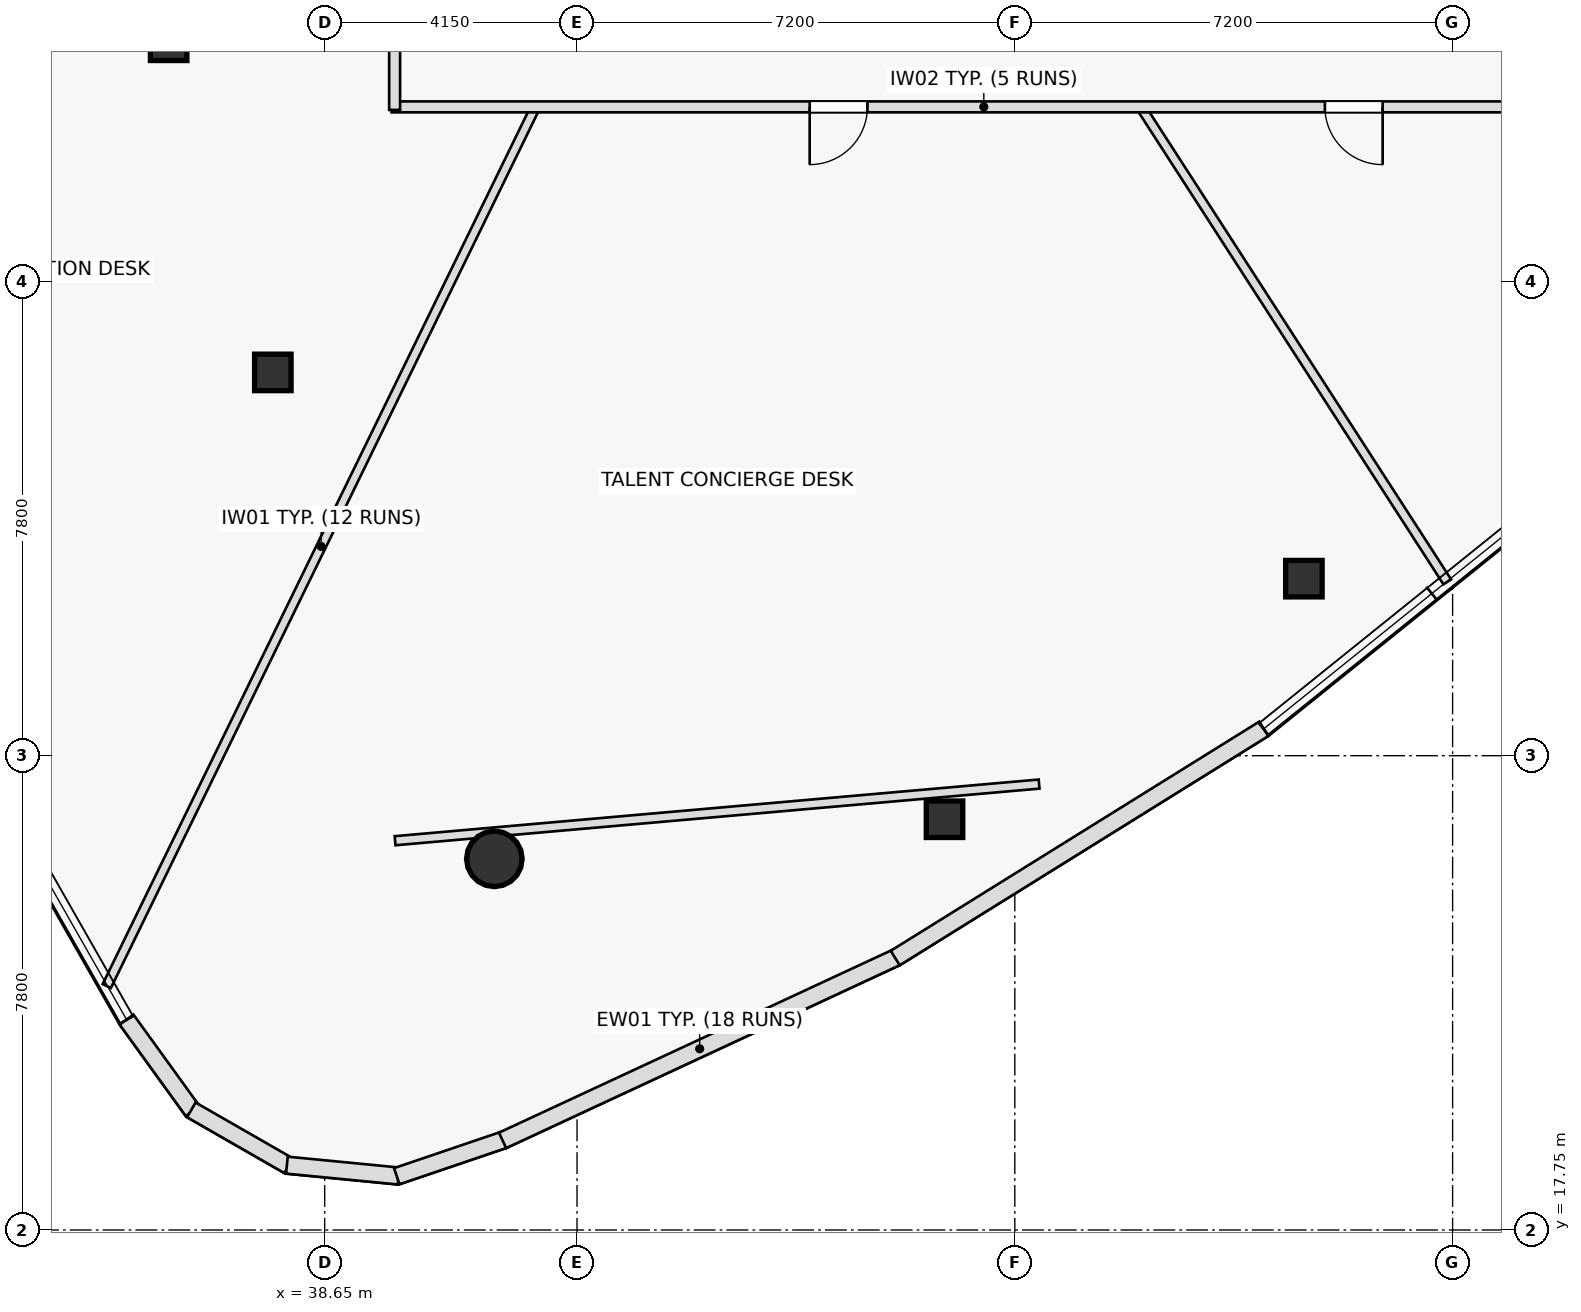
"""IFC4 building model, lengths in metres.
Left out: names, types, materials, properties, quantities, classifications, styles, units other than length and angle.
Written with IfcOpenShell. Run it as: python <this file> out.ifc"""

import sys

from ifc_helpers import new_model, si_unit, direction, frame, frame_2d, origin, origin_2d, place, context, subcontext, project, spatial, rectangle, hollow_rectangle, hollow_circle, extrude, element, fill, save


model = new_model("IFC4")
c1 = context("Model", 3, precision=1e-05, world=origin(), true_north=direction((0.0, 1.0)))
c2 = subcontext(c1, "Body", "Model", "MODEL_VIEW")
j1 = project(units=[si_unit("LENGTHUNIT", "METRE"), si_unit("PLANEANGLEUNIT", "RADIAN")], contexts=[c1])
p1 = place(None, origin())
s1 = spatial("IfcSite", under=j1, at=p1, CompositionType="ELEMENT")
p2 = place(p1, origin())
s2 = spatial("IfcBuilding", under=s1, at=p2, CompositionType="ELEMENT")
p3 = place(p2, frame((0.0, 0.0, 216.95)))
s3 = spatial("IfcBuildingStorey", under=s2, at=p3, CompositionType="ELEMENT", Elevation=216.95)
for number, where, z_axis, x_axis in (
    (1, (36.083, 37.282, 0.0), (0.0, 0.0, 1.0), (1.0, 0.0, 0.0)),
    (2, (37.797, 31.853, 0.0), (0.0, 0.0, 1.0), (1.0, 0.0, 0.0)),
):
    element("IfcColumn", number, at=place(p3, frame(where, z_axis=z_axis, x_axis=x_axis)), inside=s3, PredefinedType="COLUMN", context=c2, shape_type="SweptSolid", body=[
        extrude(hollow_rectangle(XDim=0.6, YDim=0.6, WallThickness=0.036, at=origin_2d()), origin(), (0.0, 0.0, 1.0), 4.9),
    ])
p4 = place(p3, frame((41.44, 23.854, 0.0), z_axis=(0.0, 0.0, 1.0), x_axis=(1.0, 0.0, 0.0)))
e3 = element("IfcColumn", 3, at=p4, inside=s3, PredefinedType="COLUMN", context=c2, shape_type="SweptSolid", body=[
    extrude(hollow_circle(Radius=0.457, WallThickness=0.04, at=origin_2d()), origin(), (0.0, 0.0, 1.0), 4.9),
])
for number, where, z_axis, x_axis in (
    (4, (48.844, 24.505, 0.0), (0.0, 0.0, 1.0), (1.0, 0.0, 0.0)),
    (5, (54.754, 28.462, 0.0), (0.0, 0.0, 1.0), (1.0, 0.0, 0.0)),
):
    element("IfcColumn", number, at=place(p3, frame(where, z_axis=z_axis, x_axis=x_axis)), inside=s3, PredefinedType="COLUMN", context=c2, shape_type="SweptSolid", body=[
        extrude(hollow_rectangle(XDim=0.6, YDim=0.6, WallThickness=0.036, at=origin_2d()), origin(), (0.0, 0.0, 1.0), 4.9),
    ])
p5 = place(p3, frame((39.808, 24.152, 0.0), z_axis=(0.0, 0.0, 1.0), x_axis=(0.996153584085, 0.087624408208, 0.0)))
e6 = element("IfcWall", 6, at=p5, inside=s3, PredefinedType="PARTITIONING", context=c2, shape_type="SweptSolid", body=[
    extrude(rectangle(XDim=10.632, YDim=0.15, at=frame_2d((5.316, 0.0))), origin(), (0.0, 0.0, 1.0), 4.385),
])
p6 = place(p3, frame((42.118, 36.22, 0.0), z_axis=(0.0, 0.0, 1.0), x_axis=(-0.438364723484, -0.898797179126, 0.0)))
e7 = element("IfcWall", 7, at=p6, inside=s3, PredefinedType="PARTITIONING", context=c2, shape_type="SweptSolid", body=[
    extrude(rectangle(XDim=16.086, YDim=0.15, at=frame_2d((8.043, 0.0))), origin(), (0.0, 0.0, 1.0), 4.385),
])
p7 = place(p3, frame((52.069, 36.22, 0.0), z_axis=(0.0, 0.0, 1.0), x_axis=(0.542431242732, -0.840100200516, 0.0)))
e8 = element("IfcWall", 8, at=p7, inside=s3, PredefinedType="PARTITIONING", context=c2, shape_type="SweptSolid", body=[
    extrude(rectangle(XDim=9.298, YDim=0.15, at=frame_2d((4.649, 0.0))), origin(), (0.0, 0.0, 1.0), 4.275),
])
p8 = place(p3, frame((59.23, 36.22, 0.0), z_axis=(0.0, 0.0, 1.0), x_axis=(-1.0, 0.0, 0.0)))
e9 = element("IfcWall", 9, at=p8, inside=s3, PredefinedType="PARTITIONING", context=c2, shape_type="SweptSolid", body=[
    extrude(rectangle(XDim=19.48, YDim=0.18, at=frame_2d((9.74, 0.0))), origin(), (0.0, 0.0, 1.0), 4.275),
])
p9 = place(p8, frame((3.18, 0.0, 0.0)))
e10 = element("IfcOpeningElement", 10, at=p9, cuts=e9, PredefinedType="OPENING", context=c2, shape_type="SweptSolid", body=[
    extrude(rectangle(XDim=0.95, YDim=2.05, at=frame_2d((0.475, 1.025))), frame((0.0, 0.1, 0.0), z_axis=(0.0, -1.0, 0.0), x_axis=(1.0, 0.0, 0.0)), (0.0, 0.0, 1.0), 0.2),
])
p10 = place(p8, frame((11.654, 0.0, 0.0)))
e11 = element("IfcOpeningElement", 11, at=p10, cuts=e9, PredefinedType="OPENING", context=c2, shape_type="SweptSolid", body=[
    extrude(rectangle(XDim=0.95, YDim=2.05, at=frame_2d((0.475, 1.025))), frame((0.0, 0.1, 0.0), z_axis=(0.0, -1.0, 0.0), x_axis=(1.0, 0.0, 0.0)), (0.0, 0.0, 1.0), 0.2),
])
p11 = place(p3, frame((39.8, 36.17, 0.0), z_axis=(0.0, 0.0, 1.0), x_axis=(0.0, 1.0, 0.0)))
e12 = element("IfcWall", 12, at=p11, inside=s3, PredefinedType="PARTITIONING", context=c2, shape_type="SweptSolid", body=[
    extrude(rectangle(XDim=4.08, YDim=0.18, at=frame_2d((2.04, 0.0))), origin(), (0.0, 0.0, 1.0), 4.575),
])
p12 = place(p11, frame((1.565, 0.0, 0.0)))
e13 = element("IfcOpeningElement", 13, at=p12, cuts=e12, PredefinedType="OPENING", context=c2, shape_type="SweptSolid", body=[
    extrude(rectangle(XDim=0.95, YDim=2.05, at=frame_2d((0.475, 1.025))), frame((0.0, 0.1, 0.0), z_axis=(0.0, -1.0, 0.0), x_axis=(1.0, 0.0, 0.0)), (0.0, 0.0, 1.0), 0.2),
])
p13 = place(p3, frame((35.391, 21.21, 0.0), z_axis=(0.0, 0.0, 1.0), x_axis=(0.585721048236, -0.810512710359, 0.0)))
e14 = element("IfcWall", 14, at=p13, inside=s3, PredefinedType="STANDARD", context=c2, shape_type="SweptSolid", body=[
    extrude(rectangle(XDim=1.856, YDim=0.28, at=frame_2d((0.928, 0.0))), origin(), (0.0, 0.0, 1.0), 4.9),
])
for number, where, z_axis, x_axis in (
    (15, (36.457, 19.726, 0.0), (0.0, 0.0, 1.0), (0.867, -0.498, 0.0)),
    (16, (38.028, 18.817, 0.0), (0.0, 0.0, 1.0), (0.995, -0.097, 0.0)),
):
    element("IfcWall", number, at=place(p3, frame(where, z_axis=z_axis, x_axis=x_axis)), inside=s3, PredefinedType="STANDARD", context=c2, shape_type="SweptSolid", body=[
        extrude(rectangle(XDim=1.844, YDim=0.28, at=frame_2d((0.922, 0.0))), origin(), (0.0, 0.0, 1.0), 4.9),
    ])
p14 = place(p3, frame((39.835, 18.635, 0.0), z_axis=(0.0, 0.0, 1.0), x_axis=(0.946889852701, 0.3215580925, 0.0)))
e17 = element("IfcWall", 17, at=p14, inside=s3, PredefinedType="STANDARD", context=c2, shape_type="SweptSolid", body=[
    extrude(rectangle(XDim=1.867, YDim=0.28, at=frame_2d((0.934, 0.0))), origin(), (0.0, 0.0, 1.0), 4.9),
])
p15 = place(p3, frame((41.575, 19.224, 0.0), z_axis=(0.0, 0.0, 1.0), x_axis=(0.906871974089, 0.421406244154, 0.0)))
e18 = element("IfcWall", 18, at=p15, inside=s3, PredefinedType="STANDARD", context=c2, shape_type="SweptSolid", body=[
    extrude(rectangle(XDim=7.15, YDim=0.28, at=frame_2d((3.575, 0.0))), origin(), (0.0, 0.0, 1.0), 4.9),
])
p16 = place(p3, frame((48.033, 22.223, 0.0), z_axis=(0.0, 0.0, 1.0), x_axis=(0.849208634316, 0.52805747358, 0.0)))
e19 = element("IfcWall", 19, at=p16, inside=s3, PredefinedType="STANDARD", context=c2, shape_type="SweptSolid", body=[
    extrude(rectangle(XDim=7.137, YDim=0.28, at=frame_2d((3.569, 0.0))), origin(), (0.0, 0.0, 1.0), 4.9),
])
p17 = place(p9, origin())
e20 = element("IfcDoor", 20, at=p17, inside=s3, OperationType="SINGLE_SWING_LEFT", PredefinedType="DOOR", context=c2, shape_type="SweptSolid", body=[
    extrude(rectangle(XDim=0.95, YDim=2.05, at=frame_2d((0.475, 1.025))), frame((0.0, 0.025, 0.0), z_axis=(0.0, -1.0, 0.0), x_axis=(1.0, 0.0, 0.0)), (0.0, 0.0, 1.0), 0.05),
])
fill(e10, e20)
p18 = place(p10, origin())
e21 = element("IfcDoor", 21, at=p18, inside=s3, OperationType="SINGLE_SWING_RIGHT", PredefinedType="DOOR", context=c2, shape_type="SweptSolid", body=[
    extrude(rectangle(XDim=0.95, YDim=2.05, at=frame_2d((0.475, 1.025))), frame((0.0, 0.025, 0.0), z_axis=(0.0, -1.0, 0.0), x_axis=(1.0, 0.0, 0.0)), (0.0, 0.0, 1.0), 0.05),
])
fill(e11, e21)
save(model, sys.argv[1])
